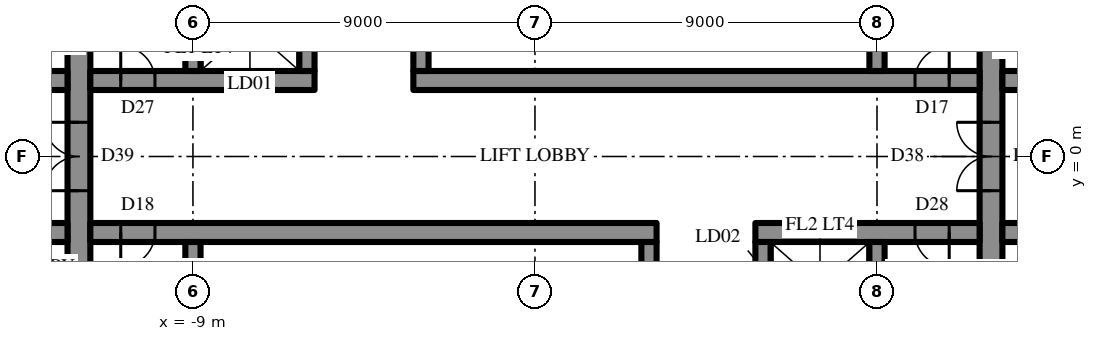
"""IFC4 building model, lengths in metres.
Left out: names, types, materials, properties, quantities, classifications, styles, units other than length and angle.
Written with IfcOpenShell. Run it as: python <this file> out.ifc"""

import sys

from ifc_helpers import new_model, si_unit, direction, frame, frame_2d, origin, place, context, subcontext, project, spatial, rectangle, extrude, element, fill, save


model = new_model("IFC4")
c1 = context("Model", 3, precision=1e-05, world=origin(), true_north=direction((0.0, 1.0)))
c2 = subcontext(c1, "Body", "Model", "MODEL_VIEW")
j1 = project(units=[si_unit("LENGTHUNIT", "METRE"), si_unit("PLANEANGLEUNIT", "RADIAN")], contexts=[c1])
p1 = place(None, origin())
s1 = spatial("IfcSite", under=j1, at=p1, CompositionType="ELEMENT")
p2 = place(p1, origin())
s2 = spatial("IfcBuilding", under=s1, at=p2, CompositionType="ELEMENT")
p3 = place(p2, frame((0.0, 0.0, -9.0)))
s3 = spatial("IfcBuildingStorey", under=s2, at=p3, CompositionType="ELEMENT", Elevation=-9.0)
p4 = place(p3, frame((12.0, -10.7, 0.0), z_axis=(0.0, 0.0, 1.0), x_axis=(0.0, 1.0, 0.0)))
e1 = element("IfcWall", 1, at=p4, inside=s3, PredefinedType="SHEAR", context=c2, shape_type="SweptSolid", body=[
    extrude(rectangle(XDim=21.4, YDim=0.6, at=frame_2d((10.7, 0.0))), origin(), (0.0, 0.0, 1.0), 4.5),
])
p5 = place(p4, frame((9.8, 0.0, 0.0)))
e2 = element("IfcOpeningElement", 2, at=p5, cuts=e1, PredefinedType="OPENING", context=c2, shape_type="SweptSolid", body=[
    extrude(rectangle(XDim=1.8, YDim=2.4, at=frame_2d((0.9, 1.2))), frame((0.0, 0.31, 0.0), z_axis=(0.0, -1.0, 0.0), x_axis=(1.0, 0.0, 0.0)), (0.0, 0.0, 1.0), 0.62),
])
p6 = place(p3, frame((-12.0, -10.7, 0.0), z_axis=(0.0, 0.0, 1.0), x_axis=(0.0, 1.0, 0.0)))
e3 = element("IfcWall", 3, at=p6, inside=s3, PredefinedType="SHEAR", context=c2, shape_type="SweptSolid", body=[
    extrude(rectangle(XDim=21.4, YDim=0.6, at=frame_2d((10.7, 0.0))), origin(), (0.0, 0.0, 1.0), 4.5),
])
p7 = place(p6, frame((9.8, 0.0, 0.0)))
e4 = element("IfcOpeningElement", 4, at=p7, cuts=e3, PredefinedType="OPENING", context=c2, shape_type="SweptSolid", body=[
    extrude(rectangle(XDim=1.8, YDim=2.4, at=frame_2d((0.9, 1.2))), frame((0.0, 0.31, 0.0), z_axis=(0.0, -1.0, 0.0), x_axis=(1.0, 0.0, 0.0)), (0.0, 0.0, 1.0), 0.62),
])
p8 = place(p3, frame((-14.8, 2.0, 0.0), z_axis=(0.0, 0.0, 1.0), x_axis=(1.0, 0.0, 0.0)))
e5 = element("IfcWall", 5, at=p8, inside=s3, PredefinedType="SHEAR", context=c2, shape_type="SweptSolid", body=[
    extrude(rectangle(XDim=2.5, YDim=0.5, at=frame_2d((1.25, 0.0))), origin(), (0.0, 0.0, 1.0), 4.5),
])
p9 = place(p8, frame((0.8, 0.0, 0.0)))
e6 = element("IfcOpeningElement", 6, at=p9, cuts=e5, PredefinedType="OPENING", context=c2, shape_type="SweptSolid", body=[
    extrude(rectangle(XDim=0.9, YDim=2.2, at=frame_2d((0.45, 1.1))), frame((0.0, 0.26, 0.0), z_axis=(0.0, -1.0, 0.0), x_axis=(1.0, 0.0, 0.0)), (0.0, 0.0, 1.0), 0.52),
])
p10 = place(p3, frame((-11.7, 2.0, 0.0), z_axis=(0.0, 0.0, 1.0), x_axis=(1.0, 0.0, 0.0)))
e7 = element("IfcWall", 7, at=p10, inside=s3, PredefinedType="SHEAR", context=c2, shape_type="SweptSolid", body=[
    extrude(rectangle(XDim=5.9, YDim=0.5, at=frame_2d((2.95, 0.0))), origin(), (0.0, 0.0, 1.0), 4.5),
])
p11 = place(p10, frame((0.8, 0.0, 0.0)))
e8 = element("IfcOpeningElement", 8, at=p11, cuts=e7, PredefinedType="OPENING", context=c2, shape_type="SweptSolid", body=[
    extrude(rectangle(XDim=0.9, YDim=2.2, at=frame_2d((0.45, 1.1))), frame((0.0, 0.26, 0.0), z_axis=(0.0, -1.0, 0.0), x_axis=(1.0, 0.0, 0.0)), (0.0, 0.0, 1.0), 0.52),
])
p12 = place(p3, frame((-3.2, 2.0, 0.0), z_axis=(0.0, 0.0, 1.0), x_axis=(1.0, 0.0, 0.0)))
e9 = element("IfcWall", 9, at=p12, inside=s3, PredefinedType="SHEAR", context=c2, shape_type="SweptSolid", body=[
    extrude(rectangle(XDim=14.9, YDim=0.5, at=frame_2d((7.45, 0.0))), origin(), (0.0, 0.0, 1.0), 4.5),
])
p13 = place(p12, frame((13.2, 0.0, 0.0)))
e10 = element("IfcOpeningElement", 10, at=p13, cuts=e9, PredefinedType="OPENING", context=c2, shape_type="SweptSolid", body=[
    extrude(rectangle(XDim=0.9, YDim=2.2, at=frame_2d((0.45, 1.1))), frame((0.0, 0.26, 0.0), z_axis=(0.0, -1.0, 0.0), x_axis=(1.0, 0.0, 0.0)), (0.0, 0.0, 1.0), 0.52),
])
p14 = place(p3, frame((12.3, 2.0, 0.0), z_axis=(0.0, 0.0, 1.0), x_axis=(1.0, 0.0, 0.0)))
e11 = element("IfcWall", 11, at=p14, inside=s3, PredefinedType="SHEAR", context=c2, shape_type="SweptSolid", body=[
    extrude(rectangle(XDim=2.5, YDim=0.5, at=frame_2d((1.25, 0.0))), origin(), (0.0, 0.0, 1.0), 4.5),
])
p15 = place(p14, frame((0.8, 0.0, 0.0)))
e12 = element("IfcOpeningElement", 12, at=p15, cuts=e11, PredefinedType="OPENING", context=c2, shape_type="SweptSolid", body=[
    extrude(rectangle(XDim=0.9, YDim=2.2, at=frame_2d((0.45, 1.1))), frame((0.0, 0.26, 0.0), z_axis=(0.0, -1.0, 0.0), x_axis=(1.0, 0.0, 0.0)), (0.0, 0.0, 1.0), 0.52),
])
for number, where, z_axis, x_axis in (
    (13, (-9.0, 2.25, 0.0), (0.0, 0.0, 1.0), (0.0, 1.0, 0.0)),
    (14, (-6.0, 2.25, 0.0), (0.0, 0.0, 1.0), (0.0, 1.0, 0.0)),
    (15, (-3.0, 2.25, 0.0), (0.0, 0.0, 1.0), (0.0, 1.0, 0.0)),
    (16, (9.0, 2.25, 0.0), (0.0, 0.0, 1.0), (0.0, 1.0, 0.0)),
):
    element("IfcWall", number, at=place(p3, frame(where, z_axis=z_axis, x_axis=x_axis)), inside=s3, PredefinedType="SHEAR", context=c2, shape_type="SweptSolid", body=[
        extrude(rectangle(XDim=2.3, YDim=0.4, at=frame_2d((1.15, 0.0))), origin(), (0.0, 0.0, 1.0), 4.5),
    ])
p16 = place(p3, frame((14.8, -2.0, 0.0), z_axis=(0.0, 0.0, 1.0), x_axis=(-1.0, 0.0, 0.0)))
e17 = element("IfcWall", 17, at=p16, inside=s3, PredefinedType="SHEAR", context=c2, shape_type="SweptSolid", body=[
    extrude(rectangle(XDim=2.5, YDim=0.5, at=frame_2d((1.25, 0.0))), origin(), (0.0, 0.0, 1.0), 4.5),
])
p17 = place(p16, frame((0.8, 0.0, 0.0)))
e18 = element("IfcOpeningElement", 18, at=p17, cuts=e17, PredefinedType="OPENING", context=c2, shape_type="SweptSolid", body=[
    extrude(rectangle(XDim=0.9, YDim=2.2, at=frame_2d((0.45, 1.1))), frame((0.0, 0.26, 0.0), z_axis=(0.0, -1.0, 0.0), x_axis=(1.0, 0.0, 0.0)), (0.0, 0.0, 1.0), 0.52),
])
p18 = place(p3, frame((11.7, -2.0, 0.0), z_axis=(0.0, 0.0, 1.0), x_axis=(-1.0, 0.0, 0.0)))
e19 = element("IfcWall", 19, at=p18, inside=s3, PredefinedType="SHEAR", context=c2, shape_type="SweptSolid", body=[
    extrude(rectangle(XDim=5.9, YDim=0.5, at=frame_2d((2.95, 0.0))), origin(), (0.0, 0.0, 1.0), 4.5),
])
p19 = place(p18, frame((0.8, 0.0, 0.0)))
e20 = element("IfcOpeningElement", 20, at=p19, cuts=e19, PredefinedType="OPENING", context=c2, shape_type="SweptSolid", body=[
    extrude(rectangle(XDim=0.9, YDim=2.2, at=frame_2d((0.45, 1.1))), frame((0.0, 0.26, 0.0), z_axis=(0.0, -1.0, 0.0), x_axis=(1.0, 0.0, 0.0)), (0.0, 0.0, 1.0), 0.52),
])
p20 = place(p3, frame((3.2, -2.0, 0.0), z_axis=(0.0, 0.0, 1.0), x_axis=(-1.0, 0.0, 0.0)))
e21 = element("IfcWall", 21, at=p20, inside=s3, PredefinedType="SHEAR", context=c2, shape_type="SweptSolid", body=[
    extrude(rectangle(XDim=14.9, YDim=0.5, at=frame_2d((7.45, 0.0))), origin(), (0.0, 0.0, 1.0), 4.5),
])
p21 = place(p20, frame((13.2, 0.0, 0.0)))
e22 = element("IfcOpeningElement", 22, at=p21, cuts=e21, PredefinedType="OPENING", context=c2, shape_type="SweptSolid", body=[
    extrude(rectangle(XDim=0.9, YDim=2.2, at=frame_2d((0.45, 1.1))), frame((0.0, 0.26, 0.0), z_axis=(0.0, -1.0, 0.0), x_axis=(1.0, 0.0, 0.0)), (0.0, 0.0, 1.0), 0.52),
])
p22 = place(p3, frame((-12.3, -2.0, 0.0), z_axis=(0.0, 0.0, 1.0), x_axis=(-1.0, 0.0, 0.0)))
e23 = element("IfcWall", 23, at=p22, inside=s3, PredefinedType="SHEAR", context=c2, shape_type="SweptSolid", body=[
    extrude(rectangle(XDim=2.5, YDim=0.5, at=frame_2d((1.25, 0.0))), origin(), (0.0, 0.0, 1.0), 4.5),
])
p23 = place(p22, frame((0.8, 0.0, 0.0)))
e24 = element("IfcOpeningElement", 24, at=p23, cuts=e23, PredefinedType="OPENING", context=c2, shape_type="SweptSolid", body=[
    extrude(rectangle(XDim=0.9, YDim=2.2, at=frame_2d((0.45, 1.1))), frame((0.0, 0.26, 0.0), z_axis=(0.0, -1.0, 0.0), x_axis=(1.0, 0.0, 0.0)), (0.0, 0.0, 1.0), 0.52),
])
for number, where, z_axis, x_axis in (
    (25, (9.0, -2.25, 0.0), (0.0, 0.0, 1.0), (0.0, -1.0, 0.0)),
    (26, (6.0, -2.25, 0.0), (0.0, 0.0, 1.0), (0.0, -1.0, 0.0)),
    (27, (3.0, -2.25, 0.0), (0.0, 0.0, 1.0), (0.0, -1.0, 0.0)),
    (28, (-9.0, -2.25, 0.0), (0.0, 0.0, 1.0), (0.0, -1.0, 0.0)),
):
    element("IfcWall", number, at=place(p3, frame(where, z_axis=z_axis, x_axis=x_axis)), inside=s3, PredefinedType="SHEAR", context=c2, shape_type="SweptSolid", body=[
        extrude(rectangle(XDim=2.3, YDim=0.4, at=frame_2d((1.15, 0.0))), origin(), (0.0, 0.0, 1.0), 4.5),
    ])
p24 = place(p11, origin())
e29 = element("IfcDoor", 29, at=p24, inside=s3, OperationType="SINGLE_SWING_RIGHT", PredefinedType="DOOR", context=c2, shape_type="SweptSolid", body=[
    extrude(rectangle(XDim=0.9, YDim=2.2, at=frame_2d((0.45, 1.1))), frame((0.0, 0.025, 0.0), z_axis=(0.0, -1.0, 0.0), x_axis=(1.0, 0.0, 0.0)), (0.0, 0.0, 1.0), 0.05),
])
fill(e8, e29)
p25 = place(p13, origin())
e30 = element("IfcDoor", 30, at=p25, inside=s3, OperationType="SINGLE_SWING_LEFT", PredefinedType="DOOR", context=c2, shape_type="SweptSolid", body=[
    extrude(rectangle(XDim=0.9, YDim=2.2, at=frame_2d((0.45, 1.1))), frame((0.0, 0.025, 0.0), z_axis=(0.0, -1.0, 0.0), x_axis=(1.0, 0.0, 0.0)), (0.0, 0.0, 1.0), 0.05),
])
fill(e10, e30)
p26 = place(p19, origin())
e31 = element("IfcDoor", 31, at=p26, inside=s3, OperationType="SINGLE_SWING_RIGHT", PredefinedType="DOOR", context=c2, shape_type="SweptSolid", body=[
    extrude(rectangle(XDim=0.9, YDim=2.2, at=frame_2d((0.45, 1.1))), frame((0.0, 0.025, 0.0), z_axis=(0.0, -1.0, 0.0), x_axis=(1.0, 0.0, 0.0)), (0.0, 0.0, 1.0), 0.05),
])
fill(e20, e31)
p27 = place(p21, origin())
e32 = element("IfcDoor", 32, at=p27, inside=s3, OperationType="SINGLE_SWING_LEFT", PredefinedType="DOOR", context=c2, shape_type="SweptSolid", body=[
    extrude(rectangle(XDim=0.9, YDim=2.2, at=frame_2d((0.45, 1.1))), frame((0.0, 0.025, 0.0), z_axis=(0.0, -1.0, 0.0), x_axis=(1.0, 0.0, 0.0)), (0.0, 0.0, 1.0), 0.05),
])
fill(e22, e32)
p28 = place(p5, origin())
e33 = element("IfcDoor", 33, at=p28, inside=s3, OperationType="DOUBLE_DOOR_SINGLE_SWING", PredefinedType="DOOR", context=c2, shape_type="SweptSolid", body=[
    extrude(rectangle(XDim=1.8, YDim=2.4, at=frame_2d((0.9, 1.2))), frame((0.0, 0.025, 0.0), z_axis=(0.0, -1.0, 0.0), x_axis=(1.0, 0.0, 0.0)), (0.0, 0.0, 1.0), 0.05),
])
fill(e2, e33)
p29 = place(p7, origin())
e34 = element("IfcDoor", 34, at=p29, inside=s3, OperationType="DOUBLE_DOOR_SINGLE_SWING", PredefinedType="DOOR", context=c2, shape_type="SweptSolid", body=[
    extrude(rectangle(XDim=1.8, YDim=2.4, at=frame_2d((0.9, 1.2))), frame((0.0, 0.025, 0.0), z_axis=(0.0, -1.0, 0.0), x_axis=(1.0, 0.0, 0.0)), (0.0, 0.0, 1.0), 0.05),
])
fill(e4, e34)
save(model, sys.argv[1])
